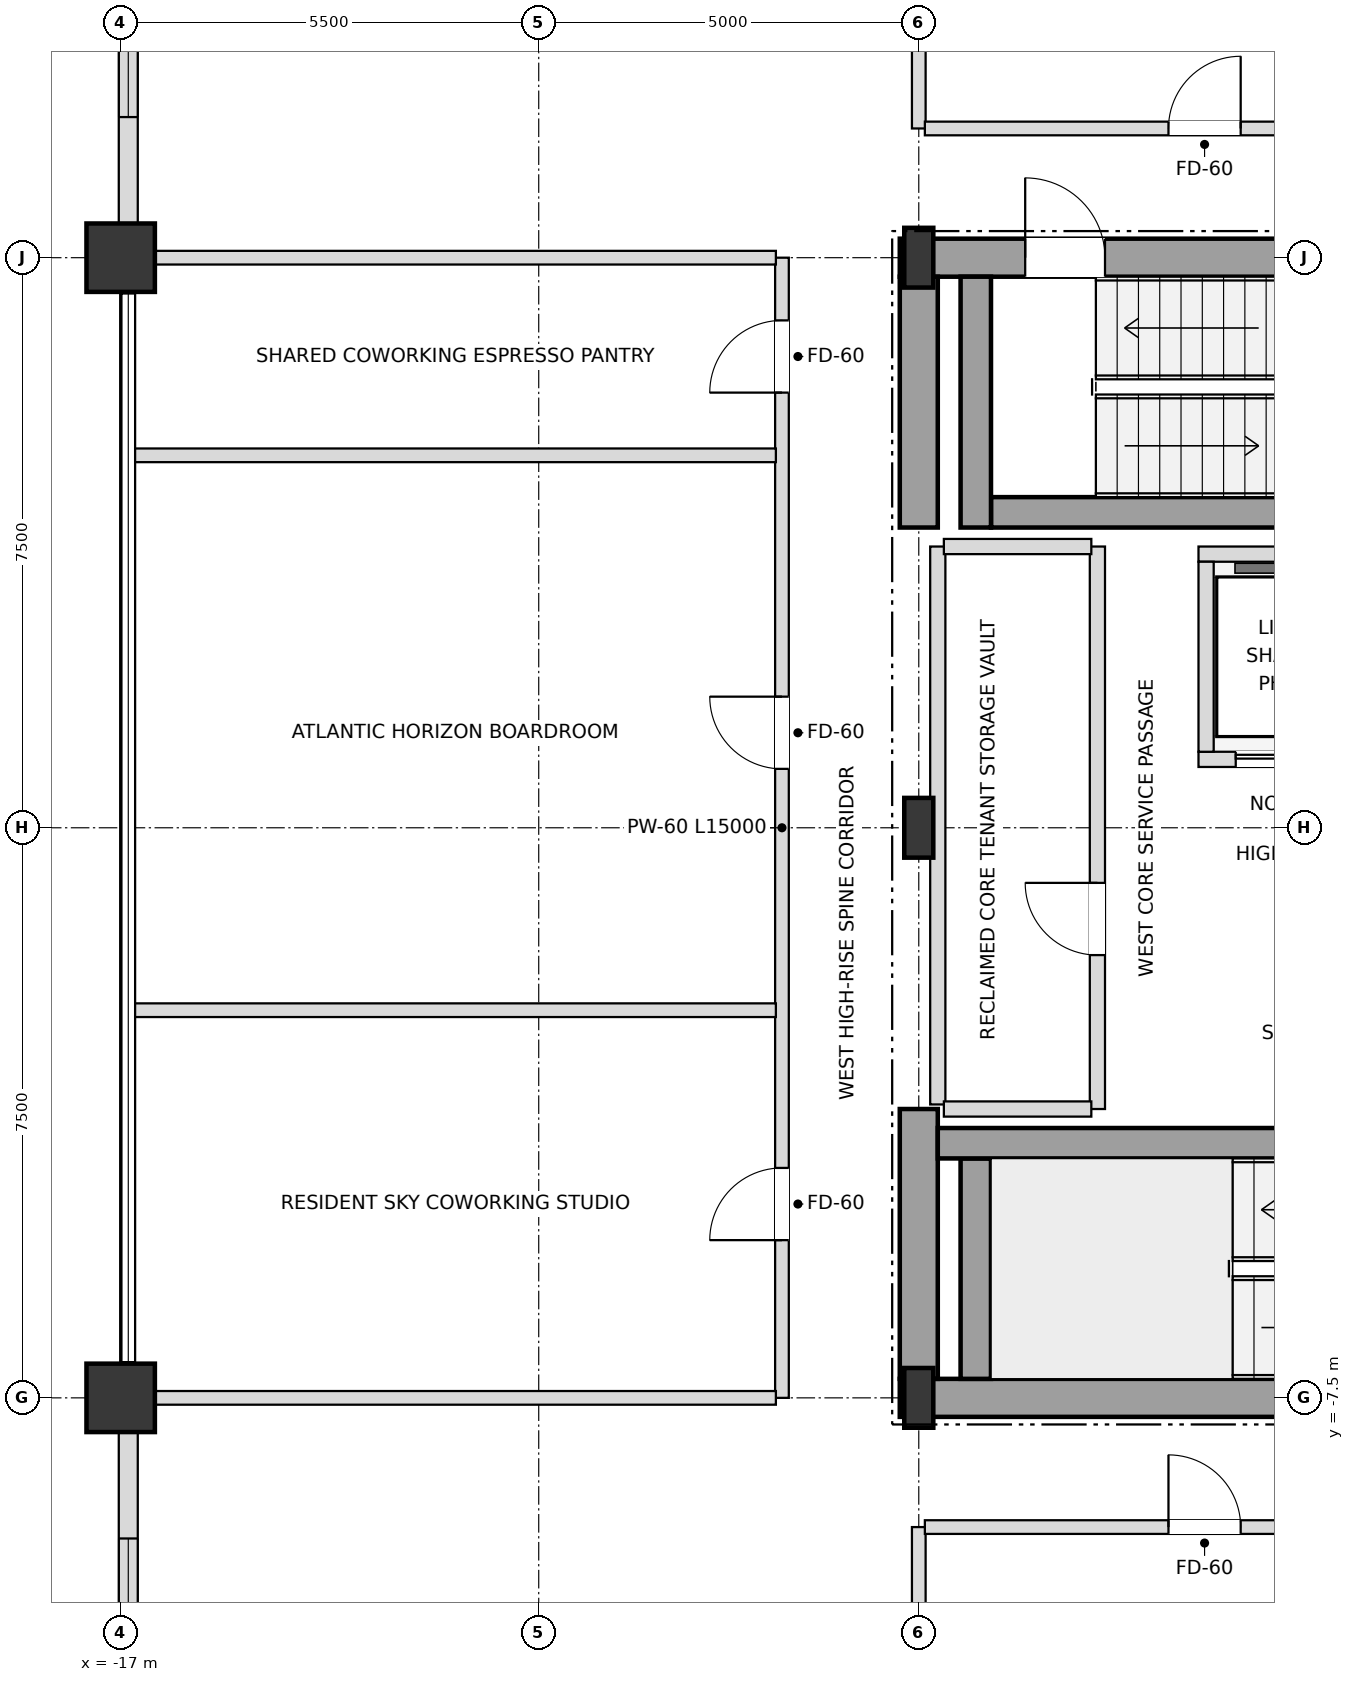
"""IFC4 building model, lengths in metres.
Left out: names, types, materials, properties, quantities, classifications, styles, units other than length and angle.
Written with IfcOpenShell. Run it as: python <this file> out.ifc"""

import sys

from ifc_helpers import new_model, si_unit, direction, frame, frame_2d, origin, origin_2d, place, context, subcontext, project, spatial, rectangle, i_section, extrude, element, fill, save


model = new_model("IFC4")
c1 = context("Model", 3, precision=1e-05, world=origin(), true_north=direction((0.0, 1.0)))
c2 = subcontext(c1, "Body", "Model", "MODEL_VIEW")
j1 = project(units=[si_unit("LENGTHUNIT", "METRE"), si_unit("PLANEANGLEUNIT", "RADIAN")], contexts=[c1])
p1 = place(None, origin())
s1 = spatial("IfcSite", under=j1, at=p1, CompositionType="ELEMENT")
p2 = place(p1, origin())
s2 = spatial("IfcBuilding", under=s1, at=p2, CompositionType="ELEMENT")
p3 = place(p2, frame((0.0, 0.0, 269.1)))
s3 = spatial("IfcBuildingStorey", under=s2, at=p3, CompositionType="ELEMENT", Elevation=269.1)
for number, where, z_axis, x_axis in (
    (1, (-6.5, -7.5, 0.0), (0.0, 0.0, 1.0), (1.0, 0.0, 0.0)),
    (2, (-6.5, 0.0, 0.0), (0.0, 0.0, 1.0), (1.0, 0.0, 0.0)),
    (3, (-6.5, 7.5, 0.0), (0.0, 0.0, 1.0), (1.0, 0.0, 0.0)),
):
    element("IfcColumn", number, at=place(p3, frame(where, z_axis=z_axis, x_axis=x_axis)), inside=s3, PredefinedType="COLUMN", context=c2, shape_type="SweptSolid", body=[
        extrude(i_section(OverallWidth=0.382, OverallDepth=0.786, WebThickness=0.02, FlangeThickness=0.033, at=origin_2d()), origin(), (0.0, 0.0, 1.0), 3.6),
    ])
for number, where, z_axis, x_axis in (
    (4, (-17.0, 7.5, 0.0), (0.0, 0.0, 1.0), (1.0, 0.0, 0.0)),
    (5, (-17.0, -7.5, 0.0), (0.0, 0.0, 1.0), (1.0, 0.0, 0.0)),
):
    element("IfcColumn", number, at=place(p3, frame(where, z_axis=z_axis, x_axis=x_axis)), inside=s3, PredefinedType="USERDEFINED", context=c2, shape_type="SweptSolid", body=[
        extrude(rectangle(XDim=0.9, YDim=0.9, at=origin_2d()), origin(), (0.0, 0.0, 1.0), 3.6),
    ])
p4 = place(p3, frame((-16.9, 12.555, 0.0), z_axis=(0.0, 0.0, 1.0), x_axis=(0.0, -1.0, 0.0)))
e6 = element("IfcWall", 6, at=p4, inside=s3, PredefinedType="SOLIDWALL", context=c2, shape_type="SweptSolid", body=[
    extrude(rectangle(XDim=4.61, YDim=0.25, at=frame_2d((2.305, 0.0))), origin(), (0.0, 0.0, 1.0), 2.748),
])
p5 = place(p4, frame((1.405, 0.0, 0.72)))
e7 = element("IfcOpeningElement", 7, at=p5, cuts=e6, PredefinedType="OPENING", context=c2, shape_type="SweptSolid", body=[
    extrude(rectangle(XDim=1.8, YDim=1.68, at=frame_2d((0.9, 0.84))), frame((0.0, 0.135, 0.0), z_axis=(0.0, -1.0, 0.0), x_axis=(1.0, 0.0, 0.0)), (0.0, 0.0, 1.0), 0.27),
])
p6 = place(p3, frame((-16.9, -7.945, 0.0), z_axis=(0.0, 0.0, 1.0), x_axis=(0.0, -1.0, 0.0)))
e8 = element("IfcWall", 8, at=p6, inside=s3, PredefinedType="SOLIDWALL", context=c2, shape_type="SweptSolid", body=[
    extrude(rectangle(XDim=4.61, YDim=0.25, at=frame_2d((2.305, 0.0))), origin(), (0.0, 0.0, 1.0), 2.748),
])
p7 = place(p6, frame((1.405, 0.0, 0.72)))
e9 = element("IfcOpeningElement", 9, at=p7, cuts=e8, PredefinedType="OPENING", context=c2, shape_type="SweptSolid", body=[
    extrude(rectangle(XDim=1.8, YDim=1.68, at=frame_2d((0.9, 0.84))), frame((0.0, 0.135, 0.0), z_axis=(0.0, -1.0, 0.0), x_axis=(1.0, 0.0, 0.0)), (0.0, 0.0, 1.0), 0.27),
])
p8 = place(p3, frame((-6.75, -7.5, 0.0), z_axis=(0.0, 0.0, 1.0), x_axis=(1.0, 0.0, 0.0)))
e10 = element("IfcWall", 10, at=p8, inside=s3, PredefinedType="SHEAR", context=c2, shape_type="SweptSolid", body=[
    extrude(rectangle(XDim=6.75, YDim=0.5, at=frame_2d((3.375, 0.0))), origin(), (0.0, 0.0, 1.0), 3.38),
])
p9 = place(p3, frame((-6.75, 7.5, 0.0), z_axis=(0.0, 0.0, 1.0), x_axis=(1.0, 0.0, 0.0)))
e11 = element("IfcWall", 11, at=p9, inside=s3, PredefinedType="SHEAR", context=c2, shape_type="SweptSolid", body=[
    extrude(rectangle(XDim=6.75, YDim=0.5, at=frame_2d((3.375, 0.0))), origin(), (0.0, 0.0, 1.0), 3.38),
])
p10 = place(p9, frame((1.65, 0.0, 0.0)))
e12 = element("IfcOpeningElement", 12, at=p10, cuts=e11, PredefinedType="OPENING", context=c2, shape_type="SweptSolid", body=[
    extrude(rectangle(XDim=1.05, YDim=2.15, at=frame_2d((0.525, 1.075))), frame((0.0, 0.26, 0.0), z_axis=(0.0, -1.0, 0.0), x_axis=(1.0, 0.0, 0.0)), (0.0, 0.0, 1.0), 0.52),
])
p11 = place(p3, frame((-6.5, -7.25, 0.0), z_axis=(0.0, 0.0, 1.0), x_axis=(0.0, 1.0, 0.0)))
e13 = element("IfcWall", 13, at=p11, inside=s3, PredefinedType="SHEAR", context=c2, shape_type="SweptSolid", body=[
    extrude(rectangle(XDim=3.55, YDim=0.5, at=frame_2d((1.775, 0.0))), origin(), (0.0, 0.0, 1.0), 3.38),
])
p12 = place(p3, frame((-6.5, 3.95, 0.0), z_axis=(0.0, 0.0, 1.0), x_axis=(0.0, 1.0, 0.0)))
e14 = element("IfcWall", 14, at=p12, inside=s3, PredefinedType="SHEAR", context=c2, shape_type="SweptSolid", body=[
    extrude(rectangle(XDim=3.3, YDim=0.5, at=frame_2d((1.65, 0.0))), origin(), (0.0, 0.0, 1.0), 3.38),
])
p13 = place(p3, frame((-5.75, -7.25, 0.0), z_axis=(0.0, 0.0, 1.0), x_axis=(0.0, 1.0, 0.0)))
e15 = element("IfcWall", 15, at=p13, inside=s3, PredefinedType="SHEAR", context=c2, shape_type="SweptSolid", body=[
    extrude(rectangle(XDim=2.9, YDim=0.4, at=frame_2d((1.45, 0.0))), origin(), (0.0, 0.0, 1.0), 3.38),
])
p14 = place(p3, frame((-6.25, -4.15, 0.0), z_axis=(0.0, 0.0, 1.0), x_axis=(1.0, 0.0, 0.0)))
e16 = element("IfcWall", 16, at=p14, inside=s3, PredefinedType="SHEAR", context=c2, shape_type="SweptSolid", body=[
    extrude(rectangle(XDim=7.78, YDim=0.4, at=frame_2d((3.89, 0.0))), origin(), (0.0, 0.0, 1.0), 3.38),
])
p15 = place(p3, frame((-5.55, 4.15, 0.0), z_axis=(0.0, 0.0, 1.0), x_axis=(1.0, 0.0, 0.0)))
e17 = element("IfcWall", 17, at=p15, inside=s3, PredefinedType="SHEAR", context=c2, shape_type="SweptSolid", body=[
    extrude(rectangle(XDim=7.08, YDim=0.4, at=frame_2d((3.54, 0.0))), origin(), (0.0, 0.0, 1.0), 3.38),
])
p16 = place(p3, frame((-5.75, 3.95, 0.0), z_axis=(0.0, 0.0, 1.0), x_axis=(0.0, 1.0, 0.0)))
e18 = element("IfcWall", 18, at=p16, inside=s3, PredefinedType="SHEAR", context=c2, shape_type="SweptSolid", body=[
    extrude(rectangle(XDim=3.3, YDim=0.4, at=frame_2d((1.65, 0.0))), origin(), (0.0, 0.0, 1.0), 3.38),
])
p17 = place(p3, frame((-2.82, 0.9, 0.0), z_axis=(0.0, 0.0, 1.0), x_axis=(1.0, 0.0, 0.0)))
e19 = element("IfcWall", 19, at=p17, inside=s3, PredefinedType="SOLIDWALL", context=c2, shape_type="SweptSolid", body=[
    extrude(rectangle(XDim=5.58, YDim=0.2, at=frame_2d((2.79, 0.0))), origin(), (0.0, 0.0, 1.0), 3.38),
])
p18 = place(p17, frame((0.49, 0.0, 0.0)))
e20 = element("IfcOpeningElement", 20, at=p18, cuts=e19, PredefinedType="OPENING", context=c2, shape_type="SweptSolid", body=[
    extrude(rectangle(XDim=1.1, YDim=2.15, at=frame_2d((0.55, 1.075))), frame((0.0, 0.11, 0.0), z_axis=(0.0, -1.0, 0.0), x_axis=(1.0, 0.0, 0.0)), (0.0, 0.0, 1.0), 0.22),
])
p19 = place(p17, frame((2.17, 0.0, 0.0)))
e21 = element("IfcOpeningElement", 21, at=p19, cuts=e19, PredefinedType="OPENING", context=c2, shape_type="SweptSolid", body=[
    extrude(rectangle(XDim=1.1, YDim=2.15, at=frame_2d((0.55, 1.075))), frame((0.0, 0.11, 0.0), z_axis=(0.0, -1.0, 0.0), x_axis=(1.0, 0.0, 0.0)), (0.0, 0.0, 1.0), 0.22),
])
p20 = place(p17, frame((3.86, 0.0, 0.0)))
e22 = element("IfcOpeningElement", 22, at=p20, cuts=e19, PredefinedType="OPENING", context=c2, shape_type="SweptSolid", body=[
    extrude(rectangle(XDim=1.2, YDim=2.2, at=frame_2d((0.6, 1.1))), frame((0.0, 0.11, 0.0), z_axis=(0.0, -1.0, 0.0), x_axis=(1.0, 0.0, 0.0)), (0.0, 0.0, 1.0), 0.22),
])
p21 = place(p3, frame((-2.82, 3.6, 0.0), z_axis=(0.0, 0.0, 1.0), x_axis=(1.0, 0.0, 0.0)))
e23 = element("IfcWall", 23, at=p21, inside=s3, PredefinedType="SOLIDWALL", context=c2, shape_type="SweptSolid", body=[
    extrude(rectangle(XDim=5.58, YDim=0.2, at=frame_2d((2.79, 0.0))), origin(), (0.0, 0.0, 1.0), 3.38),
])
p22 = place(p3, frame((-2.72, 1.0, 0.0), z_axis=(0.0, 0.0, 1.0), x_axis=(0.0, 1.0, 0.0)))
e24 = element("IfcWall", 24, at=p22, inside=s3, PredefinedType="SOLIDWALL", context=c2, shape_type="SweptSolid", body=[
    extrude(rectangle(XDim=2.5, YDim=0.2, at=frame_2d((1.25, 0.0))), origin(), (0.0, 0.0, 1.0), 3.38),
])
p23 = place(p3, frame((-8.3, -7.5, 0.0), z_axis=(0.0, 0.0, 1.0), x_axis=(0.0, 1.0, 0.0)))
e25 = element("IfcWall", 25, at=p23, inside=s3, PredefinedType="PARTITIONING", context=c2, shape_type="SweptSolid", body=[
    extrude(rectangle(XDim=15.0, YDim=0.18, at=frame_2d((7.5, 0.0))), origin(), (0.0, 0.0, 1.0), 3.38),
])
p24 = place(p23, frame((2.075, 0.0, 0.0)))
e26 = element("IfcOpeningElement", 26, at=p24, cuts=e25, PredefinedType="OPENING", context=c2, shape_type="SweptSolid", body=[
    extrude(rectangle(XDim=0.95, YDim=2.15, at=frame_2d((0.475, 1.075))), frame((0.0, 0.1, 0.0), z_axis=(0.0, -1.0, 0.0), x_axis=(1.0, 0.0, 0.0)), (0.0, 0.0, 1.0), 0.2),
])
p25 = place(p23, frame((8.275, 0.0, 0.0)))
e27 = element("IfcOpeningElement", 27, at=p25, cuts=e25, PredefinedType="OPENING", context=c2, shape_type="SweptSolid", body=[
    extrude(rectangle(XDim=0.95, YDim=2.15, at=frame_2d((0.475, 1.075))), frame((0.0, 0.1, 0.0), z_axis=(0.0, -1.0, 0.0), x_axis=(1.0, 0.0, 0.0)), (0.0, 0.0, 1.0), 0.2),
])
p26 = place(p23, frame((13.225, 0.0, 0.0)))
e28 = element("IfcOpeningElement", 28, at=p26, cuts=e25, PredefinedType="OPENING", context=c2, shape_type="SweptSolid", body=[
    extrude(rectangle(XDim=0.95, YDim=2.15, at=frame_2d((0.475, 1.075))), frame((0.0, 0.1, 0.0), z_axis=(0.0, -1.0, 0.0), x_axis=(1.0, 0.0, 0.0)), (0.0, 0.0, 1.0), 0.2),
])
for number, where, z_axis, x_axis in (
    (29, (-6.5, -19.9, 0.0), (0.0, 0.0, 1.0), (0.0, 1.0, 0.0)),
    (30, (-6.5, 9.2, 0.0), (0.0, 0.0, 1.0), (0.0, 1.0, 0.0)),
):
    element("IfcWall", number, at=place(p3, frame(where, z_axis=z_axis, x_axis=x_axis)), inside=s3, PredefinedType="PARTITIONING", context=c2, shape_type="SweptSolid", body=[
        extrude(rectangle(XDim=10.7, YDim=0.18, at=frame_2d((5.35, 0.0))), origin(), (0.0, 0.0, 1.0), 2.826),
    ])
p27 = place(p3, frame((-6.25, -3.64, 0.0), z_axis=(0.0, 0.0, 1.0), x_axis=(0.0, 1.0, 0.0)))
e31 = element("IfcWall", 31, at=p27, inside=s3, PredefinedType="SOLIDWALL", context=c2, shape_type="SweptSolid", body=[
    extrude(rectangle(XDim=7.34, YDim=0.2, at=frame_2d((3.67, 0.0))), origin(), (0.0, 0.0, 1.0), 3.38),
])
p28 = place(p3, frame((-4.15, -3.7, 0.0), z_axis=(0.0, 0.0, 1.0), x_axis=(0.0, 1.0, 0.0)))
e32 = element("IfcWall", 32, at=p28, inside=s3, PredefinedType="SOLIDWALL", context=c2, shape_type="SweptSolid", body=[
    extrude(rectangle(XDim=7.4, YDim=0.2, at=frame_2d((3.7, 0.0))), origin(), (0.0, 0.0, 1.0), 3.38),
])
p29 = place(p28, frame((2.025, 0.0, 0.0)))
e33 = element("IfcOpeningElement", 33, at=p29, cuts=e32, PredefinedType="OPENING", context=c2, shape_type="SweptSolid", body=[
    extrude(rectangle(XDim=0.95, YDim=2.15, at=frame_2d((0.475, 1.075))), frame((0.0, 0.11, 0.0), z_axis=(0.0, -1.0, 0.0), x_axis=(1.0, 0.0, 0.0)), (0.0, 0.0, 1.0), 0.22),
])
p30 = place(p3, frame((-6.42, -9.2, 0.0), z_axis=(0.0, 0.0, 1.0), x_axis=(1.0, 0.0, 0.0)))
e34 = element("IfcWall", 34, at=p30, inside=s3, PredefinedType="PARTITIONING", context=c2, shape_type="SweptSolid", body=[
    extrude(rectangle(XDim=7.34, YDim=0.18, at=frame_2d((3.67, 0.0))), origin(), (0.0, 0.0, 1.0), 3.38),
])
p31 = place(p30, frame((3.205, 0.0, 0.0)))
e35 = element("IfcOpeningElement", 35, at=p31, cuts=e34, PredefinedType="OPENING", context=c2, shape_type="SweptSolid", body=[
    extrude(rectangle(XDim=0.95, YDim=2.15, at=frame_2d((0.475, 1.075))), frame((0.0, 0.1, 0.0), z_axis=(0.0, -1.0, 0.0), x_axis=(1.0, 0.0, 0.0)), (0.0, 0.0, 1.0), 0.2),
])
p32 = place(p3, frame((-16.9, -7.5, 0.0), z_axis=(0.0, 0.0, 1.0), x_axis=(1.0, 0.0, 0.0)))
e36 = element("IfcWall", 36, at=p32, inside=s3, PredefinedType="PARTITIONING", context=c2, shape_type="SweptSolid", body=[
    extrude(rectangle(XDim=8.52, YDim=0.18, at=frame_2d((4.26, 0.0))), origin(), (0.0, 0.0, 1.0), 2.826),
])
p33 = place(p3, frame((-6.17, -3.7, 0.0), z_axis=(0.0, 0.0, 1.0), x_axis=(1.0, 0.0, 0.0)))
e37 = element("IfcWall", 37, at=p33, inside=s3, PredefinedType="SOLIDWALL", context=c2, shape_type="SweptSolid", body=[
    extrude(rectangle(XDim=1.94, YDim=0.2, at=frame_2d((0.97, 0.0))), origin(), (0.0, 0.0, 1.0), 3.38),
])
p34 = place(p3, frame((-16.82, -2.4, 0.0), z_axis=(0.0, 0.0, 1.0), x_axis=(1.0, 0.0, 0.0)))
e38 = element("IfcWall", 38, at=p34, inside=s3, PredefinedType="PARTITIONING", context=c2, shape_type="SweptSolid", body=[
    extrude(rectangle(XDim=8.44, YDim=0.18, at=frame_2d((4.22, 0.0))), origin(), (0.0, 0.0, 1.0), 3.018),
])
p35 = place(p3, frame((-6.17, 3.7, 0.0), z_axis=(0.0, 0.0, 1.0), x_axis=(1.0, 0.0, 0.0)))
e39 = element("IfcWall", 39, at=p35, inside=s3, PredefinedType="SOLIDWALL", context=c2, shape_type="SweptSolid", body=[
    extrude(rectangle(XDim=1.94, YDim=0.2, at=frame_2d((0.97, 0.0))), origin(), (0.0, 0.0, 1.0), 3.38),
])
p36 = place(p3, frame((-16.82, 4.9, 0.0), z_axis=(0.0, 0.0, 1.0), x_axis=(1.0, 0.0, 0.0)))
e40 = element("IfcWall", 40, at=p36, inside=s3, PredefinedType="PARTITIONING", context=c2, shape_type="SweptSolid", body=[
    extrude(rectangle(XDim=8.44, YDim=0.18, at=frame_2d((4.22, 0.0))), origin(), (0.0, 0.0, 1.0), 3.018),
])
p37 = place(p3, frame((-16.9, 7.5, 0.0), z_axis=(0.0, 0.0, 1.0), x_axis=(1.0, 0.0, 0.0)))
e41 = element("IfcWall", 41, at=p37, inside=s3, PredefinedType="PARTITIONING", context=c2, shape_type="SweptSolid", body=[
    extrude(rectangle(XDim=8.52, YDim=0.18, at=frame_2d((4.26, 0.0))), origin(), (0.0, 0.0, 1.0), 2.826),
])
p38 = place(p3, frame((-6.42, 9.2, 0.0), z_axis=(0.0, 0.0, 1.0), x_axis=(1.0, 0.0, 0.0)))
e42 = element("IfcWall", 42, at=p38, inside=s3, PredefinedType="PARTITIONING", context=c2, shape_type="SweptSolid", body=[
    extrude(rectangle(XDim=7.34, YDim=0.18, at=frame_2d((3.67, 0.0))), origin(), (0.0, 0.0, 1.0), 3.38),
])
p39 = place(p38, frame((3.205, 0.0, 0.0)))
e43 = element("IfcOpeningElement", 43, at=p39, cuts=e42, PredefinedType="OPENING", context=c2, shape_type="SweptSolid", body=[
    extrude(rectangle(XDim=0.95, YDim=2.15, at=frame_2d((0.475, 1.075))), frame((0.0, 0.1, 0.0), z_axis=(0.0, -1.0, 0.0), x_axis=(1.0, 0.0, 0.0)), (0.0, 0.0, 1.0), 0.2),
])
p40 = place(p5, origin())
e44 = element("IfcWindow", 44, at=p40, inside=s3, PartitioningType="SINGLE_PANEL", PredefinedType="WINDOW", context=c2, shape_type="SweptSolid", body=[
    extrude(rectangle(XDim=1.8, YDim=1.68, at=frame_2d((0.9, 0.84))), frame((0.0, 0.03, 0.0), z_axis=(0.0, -1.0, 0.0), x_axis=(1.0, 0.0, 0.0)), (0.0, 0.0, 1.0), 0.06),
])
fill(e7, e44)
p41 = place(p7, origin())
e45 = element("IfcWindow", 45, at=p41, inside=s3, PartitioningType="SINGLE_PANEL", PredefinedType="WINDOW", context=c2, shape_type="SweptSolid", body=[
    extrude(rectangle(XDim=1.8, YDim=1.68, at=frame_2d((0.9, 0.84))), frame((0.0, 0.03, 0.0), z_axis=(0.0, -1.0, 0.0), x_axis=(1.0, 0.0, 0.0)), (0.0, 0.0, 1.0), 0.06),
])
fill(e9, e45)
p42 = place(p10, origin())
e46 = element("IfcDoor", 46, at=p42, inside=s3, OperationType="SINGLE_SWING_LEFT", PredefinedType="DOOR", context=c2, shape_type="SweptSolid", body=[
    extrude(rectangle(XDim=1.05, YDim=2.15, at=frame_2d((0.525, 1.075))), frame((0.0, 0.025, 0.0), z_axis=(0.0, -1.0, 0.0), x_axis=(1.0, 0.0, 0.0)), (0.0, 0.0, 1.0), 0.05),
])
fill(e12, e46)
p43 = place(p18, origin())
e47 = element("IfcDoor", 47, at=p43, inside=s3, OperationType="DOUBLE_DOOR_SLIDING", PredefinedType="DOOR", context=c2, shape_type="SweptSolid", body=[
    extrude(rectangle(XDim=1.1, YDim=2.15, at=frame_2d((0.55, 1.075))), frame((0.0, 0.025, 0.0), z_axis=(0.0, -1.0, 0.0), x_axis=(1.0, 0.0, 0.0)), (0.0, 0.0, 1.0), 0.05),
])
fill(e20, e47)
p44 = place(p29, origin())
e48 = element("IfcDoor", 48, at=p44, inside=s3, OperationType="SINGLE_SWING_RIGHT", PredefinedType="DOOR", context=c2, shape_type="SweptSolid", body=[
    extrude(rectangle(XDim=0.95, YDim=2.15, at=frame_2d((0.475, 1.075))), frame((0.0, 0.025, 0.0), z_axis=(0.0, -1.0, 0.0), x_axis=(1.0, 0.0, 0.0)), (0.0, 0.0, 1.0), 0.05),
])
fill(e33, e48)
p45 = place(p31, origin())
e49 = element("IfcDoor", 49, at=p45, inside=s3, OperationType="SINGLE_SWING_LEFT", PredefinedType="DOOR", context=c2, shape_type="SweptSolid", body=[
    extrude(rectangle(XDim=0.95, YDim=2.15, at=frame_2d((0.475, 1.075))), frame((0.0, 0.025, 0.0), z_axis=(0.0, -1.0, 0.0), x_axis=(1.0, 0.0, 0.0)), (0.0, 0.0, 1.0), 0.05),
])
fill(e35, e49)
p46 = place(p39, origin())
e50 = element("IfcDoor", 50, at=p46, inside=s3, OperationType="SINGLE_SWING_RIGHT", PredefinedType="DOOR", context=c2, shape_type="SweptSolid", body=[
    extrude(rectangle(XDim=0.95, YDim=2.15, at=frame_2d((0.475, 1.075))), frame((0.0, 0.025, 0.0), z_axis=(0.0, -1.0, 0.0), x_axis=(1.0, 0.0, 0.0)), (0.0, 0.0, 1.0), 0.05),
])
fill(e43, e50)
p47 = place(p24, origin())
e51 = element("IfcDoor", 51, at=p47, inside=s3, OperationType="SINGLE_SWING_LEFT", PredefinedType="DOOR", context=c2, shape_type="SweptSolid", body=[
    extrude(rectangle(XDim=0.95, YDim=2.15, at=frame_2d((0.475, 1.075))), frame((0.0, 0.025, 0.0), z_axis=(0.0, -1.0, 0.0), x_axis=(1.0, 0.0, 0.0)), (0.0, 0.0, 1.0), 0.05),
])
fill(e26, e51)
p48 = place(p25, origin())
e52 = element("IfcDoor", 52, at=p48, inside=s3, OperationType="SINGLE_SWING_RIGHT", PredefinedType="DOOR", context=c2, shape_type="SweptSolid", body=[
    extrude(rectangle(XDim=0.95, YDim=2.15, at=frame_2d((0.475, 1.075))), frame((0.0, 0.025, 0.0), z_axis=(0.0, -1.0, 0.0), x_axis=(1.0, 0.0, 0.0)), (0.0, 0.0, 1.0), 0.05),
])
fill(e27, e52)
p49 = place(p26, origin())
e53 = element("IfcDoor", 53, at=p49, inside=s3, OperationType="SINGLE_SWING_LEFT", PredefinedType="DOOR", context=c2, shape_type="SweptSolid", body=[
    extrude(rectangle(XDim=0.95, YDim=2.15, at=frame_2d((0.475, 1.075))), frame((0.0, 0.025, 0.0), z_axis=(0.0, -1.0, 0.0), x_axis=(1.0, 0.0, 0.0)), (0.0, 0.0, 1.0), 0.05),
])
fill(e28, e53)
save(model, sys.argv[1])
